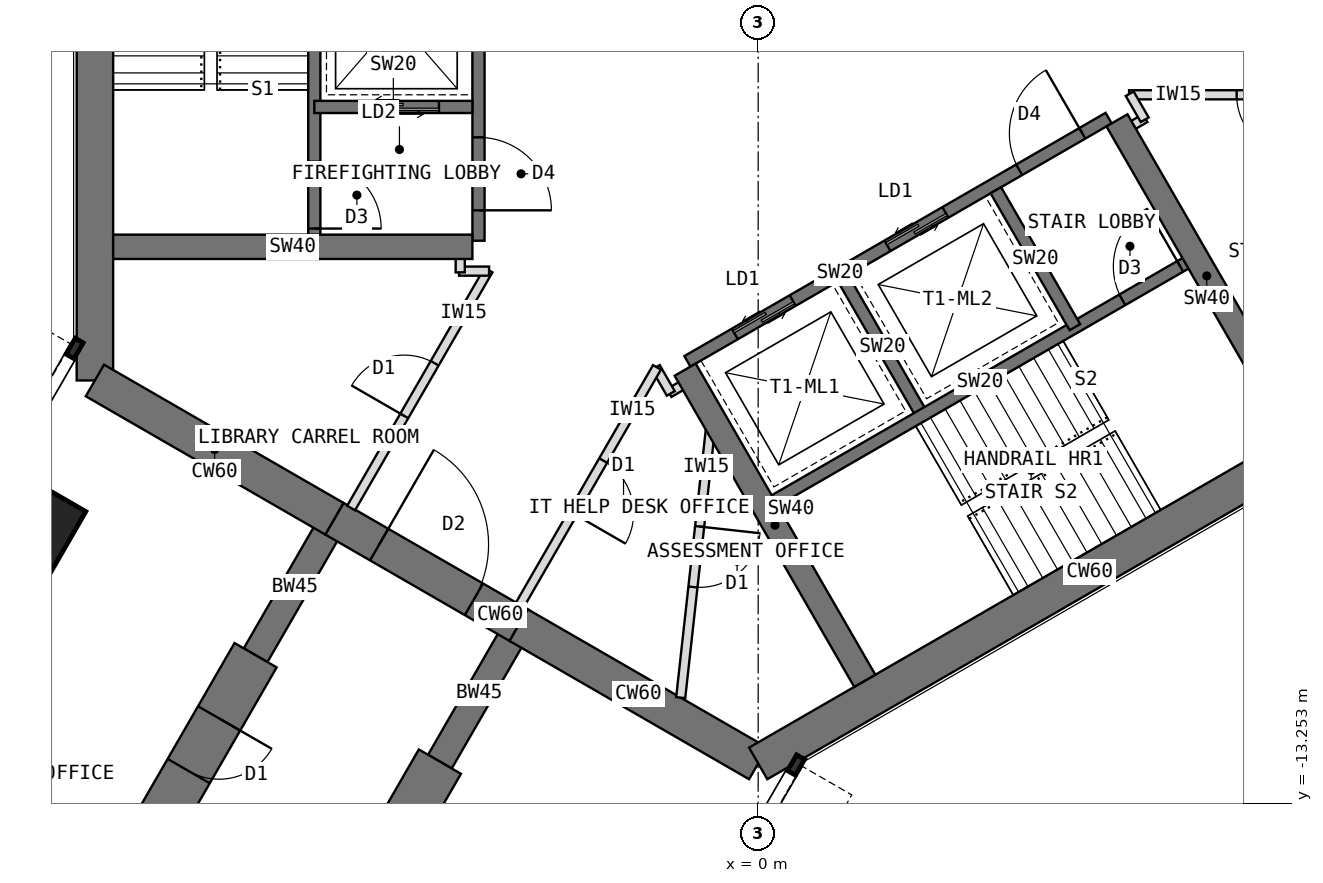
"""IFC4 building model, lengths in metres.
Left out: names, types, materials, properties, quantities, classifications, styles, units other than length and angle.
Written with IfcOpenShell. Run it as: python <this file> out.ifc"""

import sys

from ifc_helpers import new_model, si_unit, direction, frame, frame_2d, origin, origin_2d, place, context, subcontext, project, spatial, rectangle, extrude, element, fill, save


model = new_model("IFC4")
c1 = context("Model", 3, precision=1e-05, world=origin(), true_north=direction((0.0, 1.0)))
c2 = subcontext(c1, "Body", "Model", "MODEL_VIEW")
j1 = project(units=[si_unit("LENGTHUNIT", "METRE"), si_unit("PLANEANGLEUNIT", "RADIAN")], contexts=[c1])
p1 = place(None, origin())
s1 = spatial("IfcSite", under=j1, at=p1, CompositionType="ELEMENT")
p2 = place(p1, origin())
s2 = spatial("IfcBuilding", under=s1, at=p2, CompositionType="ELEMENT")
p3 = place(p2, frame((0.0, 0.0, 121.5)))
s3 = spatial("IfcBuildingStorey", under=s2, at=p3, CompositionType="ELEMENT", Elevation=121.5)
p4 = place(p3, frame((-10.908, 6.298, 0.0), z_axis=(0.0, 0.0, 1.0), x_axis=(0.0, -1.0, 0.0)))
e1 = element("IfcWall", 1, at=p4, inside=s3, PredefinedType="SHEAR", context=c2, shape_type="SweptSolid", body=[
    extrude(rectangle(XDim=12.596, YDim=0.6, at=frame_2d((6.298, 0.0))), origin(), (0.0, 0.0, 1.0), 4.0),
])
p5 = place(p3, frame((-10.908, -6.298, 0.0), z_axis=(0.0, 0.0, 1.0), x_axis=(0.866034513004, -0.499984222037, 0.0)))
e2 = element("IfcWall", 2, at=p5, inside=s3, PredefinedType="SHEAR", context=c2, shape_type="SweptSolid", body=[
    extrude(rectangle(XDim=4.548, YDim=0.6, at=frame_2d((2.274, 0.0))), origin(), (0.0, 0.0, 1.0), 4.0),
])
p6 = place(p3, frame((-6.97, -8.572, 0.0), z_axis=(0.0, 0.0, 1.0), x_axis=(0.866019471182, -0.500010275428, 0.0)))
e3 = element("IfcWall", 3, at=p6, inside=s3, PredefinedType="SHEAR", context=c2, shape_type="SweptSolid", body=[
    extrude(rectangle(XDim=3.5, YDim=0.6, at=frame_2d((1.75, 0.0))), origin(), (0.0, 0.0, 1.0), 4.0),
])
p7 = place(p6, frame((0.85, 0.0, 0.0)))
e4 = element("IfcOpeningElement", 4, at=p7, cuts=e3, PredefinedType="OPENING", context=c2, shape_type="SweptSolid", body=[
    extrude(rectangle(XDim=1.8, YDim=2.1, at=frame_2d((0.9, 1.05))), frame((0.0, 0.31, 0.0), z_axis=(0.0, -1.0, 0.0), x_axis=(1.0, 0.0, 0.0)), (0.0, 0.0, 1.0), 0.62),
])
p8 = place(p3, frame((-3.939, -10.322, 0.0), z_axis=(0.0, 0.0, 1.0), x_axis=(0.866011268655, -0.500024481964, 0.0)))
e5 = element("IfcWall", 5, at=p8, inside=s3, PredefinedType="SHEAR", context=c2, shape_type="SweptSolid", body=[
    extrude(rectangle(XDim=4.548, YDim=0.6, at=frame_2d((2.274, 0.0))), origin(), (0.0, 0.0, 1.0), 4.0),
])
p9 = place(p3, frame((0.0, -12.596, 0.0), z_axis=(0.0, 0.0, 1.0), x_axis=(0.866021940709, 0.500005998175, 0.0)))
e6 = element("IfcWall", 6, at=p9, inside=s3, PredefinedType="SHEAR", context=c2, shape_type="SweptSolid", body=[
    extrude(rectangle(XDim=12.596, YDim=0.6, at=frame_2d((6.298, 0.0))), origin(), (0.0, 0.0, 1.0), 4.0),
])
p10 = place(p3, frame((-3.939, -10.322, 0.0), z_axis=(0.0, 0.0, 1.0), x_axis=(-0.499918158782, -0.866072649678, 0.0)))
e7 = element("IfcWall", 7, at=p10, inside=s3, PredefinedType="SHEAR", context=c2, shape_type="SweptSolid", body=[
    extrude(rectangle(XDim=2.592, YDim=0.45, at=frame_2d((1.296, 0.0))), origin(), (0.0, 0.0, 1.0), 4.0),
])
p11 = place(p3, frame((-5.234, -12.566, 0.0), z_axis=(0.0, 0.0, 1.0), x_axis=(-0.499997557548, -0.86602681393, 0.0)))
e8 = element("IfcWall", 8, at=p11, inside=s3, PredefinedType="SHEAR", context=c2, shape_type="SweptSolid", body=[
    extrude(rectangle(XDim=9.5, YDim=0.8, at=frame_2d((4.75, 0.0))), origin(), (0.0, 0.0, 1.0), 4.0),
])
p12 = place(p11, frame((1.2, 0.0, 0.0)))
e9 = element("IfcOpeningElement", 9, at=p12, cuts=e8, PredefinedType="OPENING", context=c2, shape_type="SweptSolid", body=[
    extrude(rectangle(XDim=1.0, YDim=2.1, at=frame_2d((0.5, 1.05))), frame((0.0, 0.41, 0.0), z_axis=(0.0, -1.0, 0.0), x_axis=(1.0, 0.0, 0.0)), (0.0, 0.0, 1.0), 0.82),
])
p13 = place(p3, frame((-6.97, -8.572, 0.0), z_axis=(0.0, 0.0, 1.0), x_axis=(-0.499988811324, -0.866031863473, 0.0)))
e10 = element("IfcWall", 10, at=p13, inside=s3, PredefinedType="SHEAR", context=c2, shape_type="SweptSolid", body=[
    extrude(rectangle(XDim=2.592, YDim=0.45, at=frame_2d((1.296, 0.0))), origin(), (0.0, 0.0, 1.0), 4.0),
])
p14 = place(p3, frame((-8.266, -10.816, 0.0), z_axis=(0.0, 0.0, 1.0), x_axis=(-0.499997557548, -0.86602681393, 0.0)))
e11 = element("IfcWall", 11, at=p14, inside=s3, PredefinedType="SHEAR", context=c2, shape_type="SweptSolid", body=[
    extrude(rectangle(XDim=9.5, YDim=0.8, at=frame_2d((4.75, 0.0))), origin(), (0.0, 0.0, 1.0), 4.0),
])
p15 = place(p14, frame((1.2, 0.0, 0.0)))
e12 = element("IfcOpeningElement", 12, at=p15, cuts=e11, PredefinedType="OPENING", context=c2, shape_type="SweptSolid", body=[
    extrude(rectangle(XDim=1.0, YDim=2.1, at=frame_2d((0.5, 1.05))), frame((0.0, 0.41, 0.0), z_axis=(0.0, -1.0, 0.0), x_axis=(1.0, 0.0, 0.0)), (0.0, 0.0, 1.0), 0.82),
])
p16 = place(p3, frame((-11.946, -8.691, 0.0), z_axis=(0.0, 0.0, 1.0), x_axis=(0.5, 0.866025403784, 0.0)))
e13 = element("IfcColumn", 13, at=p16, inside=s3, PredefinedType="COLUMN", context=c2, shape_type="SweptSolid", body=[
    extrude(rectangle(XDim=1.3, YDim=1.3, at=origin_2d()), origin(), (0.0, 0.0, 1.0), 4.0),
])
p17 = place(p3, frame((-4.6, 4.0, 0.0), z_axis=(0.0, 0.0, 1.0), x_axis=(0.0, -1.0, 0.0)))
e14 = element("IfcWall", 14, at=p17, inside=s3, PredefinedType="SHEAR", context=c2, shape_type="SweptSolid", body=[
    extrude(rectangle(XDim=8.0, YDim=0.2, at=frame_2d((4.0, 0.0))), origin(), (0.0, 0.0, 1.0), 4.0),
])
p18 = place(p17, frame((6.3, 0.0, 0.0)))
e15 = element("IfcOpeningElement", 15, at=p18, cuts=e14, PredefinedType="OPENING", context=c2, shape_type="SweptSolid", body=[
    extrude(rectangle(XDim=1.2, YDim=2.1, at=frame_2d((0.6, 1.05))), frame((0.0, 0.11, 0.0), z_axis=(0.0, -1.0, 0.0), x_axis=(1.0, 0.0, 0.0)), (0.0, 0.0, 1.0), 0.22),
])
p19 = place(p17, frame((0.9, 0.0, 0.0)))
e16 = element("IfcOpeningElement", 16, at=p19, cuts=e14, PredefinedType="OPENING", context=c2, shape_type="SweptSolid", body=[
    extrude(rectangle(XDim=1.1, YDim=2.2, at=frame_2d((0.55, 1.1))), frame((0.0, 0.11, 0.0), z_axis=(0.0, -1.0, 0.0), x_axis=(1.0, 0.0, 0.0)), (0.0, 0.0, 1.0), 0.22),
])
p20 = place(p3, frame((-4.7, -1.8, 0.0), z_axis=(0.0, 0.0, 1.0), x_axis=(-1.0, 0.0, 0.0)))
e17 = element("IfcWall", 17, at=p20, inside=s3, PredefinedType="SHEAR", context=c2, shape_type="SweptSolid", body=[
    extrude(rectangle(XDim=2.6, YDim=0.2, at=frame_2d((1.3, 0.0))), origin(), (0.0, 0.0, 1.0), 4.0),
])
p21 = place(p20, frame((0.55, 0.0, 0.0)))
e18 = element("IfcOpeningElement", 18, at=p21, cuts=e17, PredefinedType="OPENING", context=c2, shape_type="SweptSolid", body=[
    extrude(rectangle(XDim=1.3, YDim=2.2, at=frame_2d((0.65, 1.1))), frame((0.0, 0.11, 0.0), z_axis=(0.0, -1.0, 0.0), x_axis=(1.0, 0.0, 0.0)), (0.0, 0.0, 1.0), 0.22),
])
p22 = place(p3, frame((-7.3, 4.0, 0.0), z_axis=(0.0, 0.0, 1.0), x_axis=(0.0, -1.0, 0.0)))
e19 = element("IfcWall", 19, at=p22, inside=s3, PredefinedType="SHEAR", context=c2, shape_type="SweptSolid", body=[
    extrude(rectangle(XDim=8.0, YDim=0.2, at=frame_2d((4.0, 0.0))), origin(), (0.0, 0.0, 1.0), 4.0),
])
p23 = place(p22, frame((6.7, 0.0, 0.0)))
e20 = element("IfcOpeningElement", 20, at=p23, cuts=e19, PredefinedType="OPENING", context=c2, shape_type="SweptSolid", body=[
    extrude(rectangle(XDim=1.1, YDim=2.1, at=frame_2d((0.55, 1.05))), frame((0.0, 0.11, 0.0), z_axis=(0.0, -1.0, 0.0), x_axis=(1.0, 0.0, 0.0)), (0.0, 0.0, 1.0), 0.22),
])
p24 = place(p3, frame((-4.7, -4.1, 0.0), z_axis=(0.0, 0.0, 1.0), x_axis=(-1.0, 0.0, 0.0)))
e21 = element("IfcWall", 21, at=p24, inside=s3, PredefinedType="SHEAR", context=c2, shape_type="SweptSolid", body=[
    extrude(rectangle(XDim=5.908, YDim=0.4, at=frame_2d((2.954, 0.0))), origin(), (0.0, 0.0, 1.0), 4.0),
])
p25 = place(p3, frame((-1.164, -5.984, 0.0), z_axis=(0.0, 0.0, 1.0), x_axis=(0.866026010844, 0.49999894854, 0.0)))
e22 = element("IfcWall", 22, at=p25, inside=s3, PredefinedType="SHEAR", context=c2, shape_type="SweptSolid", body=[
    extrude(rectangle(XDim=8.0, YDim=0.2, at=frame_2d((4.0, 0.0))), origin(), (0.0, 0.0, 1.0), 4.0),
])
p26 = place(p25, frame((6.3, 0.0, 0.0)))
e23 = element("IfcOpeningElement", 23, at=p26, cuts=e22, PredefinedType="OPENING", context=c2, shape_type="SweptSolid", body=[
    extrude(rectangle(XDim=1.2, YDim=2.1, at=frame_2d((0.6, 1.05))), frame((0.0, 0.11, 0.0), z_axis=(0.0, -1.0, 0.0), x_axis=(1.0, 0.0, 0.0)), (0.0, 0.0, 1.0), 0.22),
])
p27 = place(p25, frame((0.9, 0.0, 0.0)))
e24 = element("IfcOpeningElement", 24, at=p27, cuts=e22, PredefinedType="OPENING", context=c2, shape_type="SweptSolid", body=[
    extrude(rectangle(XDim=1.1, YDim=2.2, at=frame_2d((0.55, 1.1))), frame((0.0, 0.11, 0.0), z_axis=(0.0, -1.0, 0.0), x_axis=(1.0, 0.0, 0.0)), (0.0, 0.0, 1.0), 0.22),
])
p28 = place(p25, frame((3.8, 0.0, 0.0)))
e25 = element("IfcOpeningElement", 25, at=p28, cuts=e22, PredefinedType="OPENING", context=c2, shape_type="SweptSolid", body=[
    extrude(rectangle(XDim=1.1, YDim=2.2, at=frame_2d((0.55, 1.1))), frame((0.0, 0.11, 0.0), z_axis=(0.0, -1.0, 0.0), x_axis=(1.0, 0.0, 0.0)), (0.0, 0.0, 1.0), 0.22),
])
p29 = place(p3, frame((1.397, -4.62, 0.0), z_axis=(0.0, 0.0, 1.0), x_axis=(0.499936506574, -0.866062058628, 0.0)))
e26 = element("IfcWall", 26, at=p29, inside=s3, PredefinedType="SHEAR", context=c2, shape_type="SweptSolid", body=[
    extrude(rectangle(XDim=2.6, YDim=0.2, at=frame_2d((1.3, 0.0))), origin(), (0.0, 0.0, 1.0), 4.0),
])
p30 = place(p3, frame((3.909, -3.17, 0.0), z_axis=(0.0, 0.0, 1.0), x_axis=(0.49997716683, -0.86603858612, 0.0)))
e27 = element("IfcWall", 27, at=p30, inside=s3, PredefinedType="SHEAR", context=c2, shape_type="SweptSolid", body=[
    extrude(rectangle(XDim=2.6, YDim=0.2, at=frame_2d((1.3, 0.0))), origin(), (0.0, 0.0, 1.0), 4.0),
])
p31 = place(p3, frame((0.186, -8.322, 0.0), z_axis=(0.0, 0.0, 1.0), x_axis=(0.866026010844, 0.49999894854, 0.0)))
e28 = element("IfcWall", 28, at=p31, inside=s3, PredefinedType="SHEAR", context=c2, shape_type="SweptSolid", body=[
    extrude(rectangle(XDim=8.0, YDim=0.2, at=frame_2d((4.0, 0.0))), origin(), (0.0, 0.0, 1.0), 4.0),
])
p32 = place(p31, frame((6.7, 0.0, 0.0)))
e29 = element("IfcOpeningElement", 29, at=p32, cuts=e28, PredefinedType="OPENING", context=c2, shape_type="SweptSolid", body=[
    extrude(rectangle(XDim=1.1, YDim=2.1, at=frame_2d((0.55, 1.05))), frame((0.0, 0.11, 0.0), z_axis=(0.0, -1.0, 0.0), x_axis=(1.0, 0.0, 0.0)), (0.0, 0.0, 1.0), 0.22),
])
p33 = place(p3, frame((5.901, -2.02, 0.0), z_axis=(0.0, 0.0, 1.0), x_axis=(0.500027676417, -0.866009424208, 0.0)))
e30 = element("IfcWall", 30, at=p33, inside=s3, PredefinedType="SHEAR", context=c2, shape_type="SweptSolid", body=[
    extrude(rectangle(XDim=5.908, YDim=0.4, at=frame_2d((2.954, 0.0))), origin(), (0.0, 0.0, 1.0), 4.0),
])
p34 = place(p3, frame((-1.201, -6.12, 0.0), z_axis=(0.0, 0.0, 1.0), x_axis=(0.49999668571, -0.866027317282, 0.0)))
e31 = element("IfcWall", 31, at=p34, inside=s3, PredefinedType="SHEAR", context=c2, shape_type="SweptSolid", body=[
    extrude(rectangle(XDim=5.908, YDim=0.4, at=frame_2d((2.954, 0.0))), origin(), (0.0, 0.0, 1.0), 4.0),
])
for number, where, z_axis, x_axis in (
    (32, (6.365, -1.983, 0.0), (0.0, 0.0, 1.0), (-0.866, -0.5, 0.0)),
    (33, (-1.092, -6.289, 0.0), (0.0, 0.0, 1.0), (-0.866, -0.5, 0.0)),
):
    element("IfcWall", number, at=place(p3, frame(where, z_axis=z_axis, x_axis=x_axis)), inside=s3, PredefinedType="PARTITIONING", context=c2, shape_type="SweptSolid", body=[
        extrude(rectangle(XDim=0.43, YDim=0.15, at=frame_2d((0.215, 0.0))), origin(), (0.0, 0.0, 1.0), 3.8),
    ])
p35 = place(p3, frame((-1.437, -6.511, 0.0), z_axis=(0.0, 0.0, 1.0), x_axis=(-0.50033519877, 0.865831790172, 0.0)))
e34 = element("IfcWall", 34, at=p35, inside=s3, PredefinedType="PARTITIONING", context=c2, shape_type="SweptSolid", body=[
    extrude(rectangle(XDim=0.494, YDim=0.15, at=frame_2d((0.247, 0.0))), origin(), (0.0, 0.0, 1.0), 3.8),
])
p36 = place(p3, frame((-1.664, -6.083, 0.0), z_axis=(0.0, 0.0, 1.0), x_axis=(-0.500032713409, -0.866006515865, 0.0)))
e35 = element("IfcWall", 35, at=p36, inside=s3, PredefinedType="PARTITIONING", context=c2, shape_type="SweptSolid", body=[
    extrude(rectangle(XDim=4.518, YDim=0.15, at=frame_2d((2.259, 0.0))), origin(), (0.0, 0.0, 1.0), 3.8),
])
p37 = place(p36, frame((1.769, 0.0, 0.0)))
e36 = element("IfcOpeningElement", 36, at=p37, cuts=e35, PredefinedType="OPENING", context=c2, shape_type="SweptSolid", body=[
    extrude(rectangle(XDim=1.0, YDim=2.1, at=frame_2d((0.5, 1.05))), frame((0.0, 0.085, 0.0), z_axis=(0.0, -1.0, 0.0), x_axis=(1.0, 0.0, 0.0)), (0.0, 0.0, 1.0), 0.17),
])
p38 = place(p3, frame((-6.695, -8.396, 0.0), z_axis=(0.0, 0.0, 1.0), x_axis=(0.500009315796, 0.86602002524, 0.0)))
e37 = element("IfcWall", 37, at=p38, inside=s3, PredefinedType="PARTITIONING", context=c2, shape_type="SweptSolid", body=[
    extrude(rectangle(XDim=4.519, YDim=0.15, at=frame_2d((2.259, 0.0))), origin(), (0.0, 0.0, 1.0), 3.8),
])
p39 = place(p38, frame((1.749, 0.0, 0.0)))
e38 = element("IfcOpeningElement", 38, at=p39, cuts=e37, PredefinedType="OPENING", context=c2, shape_type="SweptSolid", body=[
    extrude(rectangle(XDim=1.0, YDim=2.1, at=frame_2d((0.5, 1.05))), frame((0.0, 0.085, 0.0), z_axis=(0.0, -1.0, 0.0), x_axis=(1.0, 0.0, 0.0)), (0.0, 0.0, 1.0), 0.17),
])
p40 = place(p3, frame((-4.426, -4.5, 0.0), z_axis=(0.0, 0.0, 1.0), x_axis=(-1.0, 0.0, 0.0)))
e39 = element("IfcWall", 39, at=p40, inside=s3, PredefinedType="PARTITIONING", context=c2, shape_type="SweptSolid", body=[
    extrude(rectangle(XDim=0.494, YDim=0.15, at=frame_2d((0.247, 0.0))), origin(), (0.0, 0.0, 1.0), 3.8),
])
p41 = place(p3, frame((-4.9, -4.52, 0.0), z_axis=(0.0, 0.0, 1.0), x_axis=(0.0, 1.0, 0.0)))
e40 = element("IfcWall", 40, at=p41, inside=s3, PredefinedType="PARTITIONING", context=c2, shape_type="SweptSolid", body=[
    extrude(rectangle(XDim=0.43, YDim=0.15, at=frame_2d((0.215, 0.0))), origin(), (0.0, 0.0, 1.0), 3.8),
])
p42 = place(p3, frame((10.618, -1.6, 0.0), z_axis=(0.0, 0.0, 1.0), x_axis=(-1.0, 0.0, 0.0)))
e41 = element("IfcWall", 41, at=p42, inside=s3, PredefinedType="PARTITIONING", context=c2, shape_type="SweptSolid", body=[
    extrude(rectangle(XDim=4.519, YDim=0.15, at=frame_2d((2.259, 0.0))), origin(), (0.0, 0.0, 1.0), 3.8),
])
p43 = place(p42, frame((1.749, 0.0, 0.0)))
e42 = element("IfcOpeningElement", 42, at=p43, cuts=e41, PredefinedType="OPENING", context=c2, shape_type="SweptSolid", body=[
    extrude(rectangle(XDim=1.0, YDim=2.1, at=frame_2d((0.5, 1.05))), frame((0.0, 0.085, 0.0), z_axis=(0.0, -1.0, 0.0), x_axis=(1.0, 0.0, 0.0)), (0.0, 0.0, 1.0), 0.17),
])
p44 = place(p3, frame((6.11, -1.583, 0.0), z_axis=(0.0, 0.0, 1.0), x_axis=(0.50033519877, -0.865831790172, 0.0)))
e43 = element("IfcWall", 43, at=p44, inside=s3, PredefinedType="PARTITIONING", context=c2, shape_type="SweptSolid", body=[
    extrude(rectangle(XDim=0.494, YDim=0.15, at=frame_2d((0.247, 0.0))), origin(), (0.0, 0.0, 1.0), 3.8),
])
p45 = place(p3, frame((-0.761, -6.881, 0.0), z_axis=(0.0, 0.0, 1.0), x_axis=(-0.109994603044, -0.993932184458, 0.0)))
e44 = element("IfcWall", 44, at=p45, inside=s3, PredefinedType="PARTITIONING", context=c2, shape_type="SweptSolid", body=[
    extrude(rectangle(XDim=4.661, YDim=0.15, at=frame_2d((2.331, 0.0))), origin(), (0.0, 0.0, 1.0), 3.8),
])
p46 = place(p45, frame((1.831, 0.0, 0.0)))
e45 = element("IfcOpeningElement", 45, at=p46, cuts=e44, PredefinedType="OPENING", context=c2, shape_type="SweptSolid", body=[
    extrude(rectangle(XDim=1.0, YDim=2.1, at=frame_2d((0.5, 1.05))), frame((0.0, 0.085, 0.0), z_axis=(0.0, -1.0, 0.0), x_axis=(1.0, 0.0, 0.0)), (0.0, 0.0, 1.0), 0.17),
])
p47 = place(p18, origin())
e46 = element("IfcDoor", 46, at=p47, inside=s3, OperationType="SINGLE_SWING_RIGHT", PredefinedType="DOOR", context=c2, shape_type="SweptSolid", body=[
    extrude(rectangle(XDim=1.2, YDim=2.1, at=frame_2d((0.6, 1.05))), frame((0.0, 0.025, 0.0), z_axis=(0.0, -1.0, 0.0), x_axis=(1.0, 0.0, 0.0)), (0.0, 0.0, 1.0), 0.05),
])
fill(e15, e46)
p48 = place(p21, origin())
e47 = element("IfcDoor", 47, at=p48, inside=s3, OperationType="DOUBLE_DOOR_SLIDING", PredefinedType="DOOR", context=c2, shape_type="SweptSolid", body=[
    extrude(rectangle(XDim=1.3, YDim=2.2, at=frame_2d((0.65, 1.1))), frame((0.0, 0.025, 0.0), z_axis=(0.0, -1.0, 0.0), x_axis=(1.0, 0.0, 0.0)), (0.0, 0.0, 1.0), 0.05),
])
fill(e18, e47)
p49 = place(p23, origin())
e48 = element("IfcDoor", 48, at=p49, inside=s3, OperationType="SINGLE_SWING_RIGHT", PredefinedType="DOOR", context=c2, shape_type="SweptSolid", body=[
    extrude(rectangle(XDim=1.1, YDim=2.1, at=frame_2d((0.55, 1.05))), frame((0.0, 0.025, 0.0), z_axis=(0.0, -1.0, 0.0), x_axis=(1.0, 0.0, 0.0)), (0.0, 0.0, 1.0), 0.05),
])
fill(e20, e48)
p50 = place(p26, origin())
e49 = element("IfcDoor", 49, at=p50, inside=s3, OperationType="SINGLE_SWING_RIGHT", PredefinedType="DOOR", context=c2, shape_type="SweptSolid", body=[
    extrude(rectangle(XDim=1.2, YDim=2.1, at=frame_2d((0.6, 1.05))), frame((0.0, 0.025, 0.0), z_axis=(0.0, -1.0, 0.0), x_axis=(1.0, 0.0, 0.0)), (0.0, 0.0, 1.0), 0.05),
])
fill(e23, e49)
p51 = place(p27, origin())
e50 = element("IfcDoor", 50, at=p51, inside=s3, OperationType="DOUBLE_DOOR_SLIDING", PredefinedType="DOOR", context=c2, shape_type="SweptSolid", body=[
    extrude(rectangle(XDim=1.1, YDim=2.2, at=frame_2d((0.55, 1.1))), frame((0.0, 0.025, 0.0), z_axis=(0.0, -1.0, 0.0), x_axis=(1.0, 0.0, 0.0)), (0.0, 0.0, 1.0), 0.05),
])
fill(e24, e50)
p52 = place(p28, origin())
e51 = element("IfcDoor", 51, at=p52, inside=s3, OperationType="DOUBLE_DOOR_SLIDING", PredefinedType="DOOR", context=c2, shape_type="SweptSolid", body=[
    extrude(rectangle(XDim=1.1, YDim=2.2, at=frame_2d((0.55, 1.1))), frame((0.0, 0.025, 0.0), z_axis=(0.0, -1.0, 0.0), x_axis=(1.0, 0.0, 0.0)), (0.0, 0.0, 1.0), 0.05),
])
fill(e25, e51)
p53 = place(p32, origin())
e52 = element("IfcDoor", 52, at=p53, inside=s3, OperationType="SINGLE_SWING_RIGHT", PredefinedType="DOOR", context=c2, shape_type="SweptSolid", body=[
    extrude(rectangle(XDim=1.1, YDim=2.1, at=frame_2d((0.55, 1.05))), frame((0.0, 0.025, 0.0), z_axis=(0.0, -1.0, 0.0), x_axis=(1.0, 0.0, 0.0)), (0.0, 0.0, 1.0), 0.05),
])
fill(e29, e52)
p54 = place(p7, origin())
e53 = element("IfcDoor", 53, at=p54, inside=s3, OperationType="DOUBLE_DOOR_DOUBLE_SWING", PredefinedType="DOOR", context=c2, shape_type="SweptSolid", body=[
    extrude(rectangle(XDim=1.72, YDim=2.06, at=frame_2d((0.9, 1.03))), frame((0.0, 0.025, 0.0), z_axis=(0.0, -1.0, 0.0), x_axis=(1.0, 0.0, 0.0)), (0.0, 0.0, 1.0), 0.05),
    extrude(rectangle(XDim=0.04, YDim=2.1, at=frame_2d((0.02, 1.05))), frame((0.0, 0.3, 0.0), z_axis=(0.0, -1.0, 0.0), x_axis=(1.0, 0.0, 0.0)), (0.0, 0.0, 1.0), 0.6),
    extrude(rectangle(XDim=0.04, YDim=2.1, at=frame_2d((1.78, 1.05))), frame((0.0, 0.3, 0.0), z_axis=(0.0, -1.0, 0.0), x_axis=(1.0, 0.0, 0.0)), (0.0, 0.0, 1.0), 0.6),
    extrude(rectangle(XDim=1.72, YDim=0.04, at=frame_2d((0.9, 2.08))), frame((0.0, 0.3, 0.0), z_axis=(0.0, -1.0, 0.0), x_axis=(1.0, 0.0, 0.0)), (0.0, 0.0, 1.0), 0.6),
])
fill(e4, e53)
p55 = place(p39, origin())
e54 = element("IfcDoor", 54, at=p55, inside=s3, OperationType="SINGLE_SWING_LEFT", PredefinedType="DOOR", context=c2, shape_type="SweptSolid", body=[
    extrude(rectangle(XDim=1.0, YDim=2.1, at=frame_2d((0.5, 1.05))), frame((0.0, 0.025, 0.0), z_axis=(0.0, -1.0, 0.0), x_axis=(1.0, 0.0, 0.0)), (0.0, 0.0, 1.0), 0.05),
])
fill(e38, e54)
p56 = place(p37, origin())
e55 = element("IfcDoor", 55, at=p56, inside=s3, OperationType="SINGLE_SWING_RIGHT", PredefinedType="DOOR", context=c2, shape_type="SweptSolid", body=[
    extrude(rectangle(XDim=1.0, YDim=2.1, at=frame_2d((0.5, 1.05))), frame((0.0, 0.025, 0.0), z_axis=(0.0, -1.0, 0.0), x_axis=(1.0, 0.0, 0.0)), (0.0, 0.0, 1.0), 0.05),
])
fill(e36, e55)
p57 = place(p46, origin())
e56 = element("IfcDoor", 56, at=p57, inside=s3, OperationType="SINGLE_SWING_LEFT", PredefinedType="DOOR", context=c2, shape_type="SweptSolid", body=[
    extrude(rectangle(XDim=1.0, YDim=2.1, at=frame_2d((0.5, 1.05))), frame((0.0, 0.025, 0.0), z_axis=(0.0, -1.0, 0.0), x_axis=(1.0, 0.0, 0.0)), (0.0, 0.0, 1.0), 0.05),
])
fill(e45, e56)
p58 = place(p43, origin())
e57 = element("IfcDoor", 57, at=p58, inside=s3, OperationType="SINGLE_SWING_LEFT", PredefinedType="DOOR", context=c2, shape_type="SweptSolid", body=[
    extrude(rectangle(XDim=1.0, YDim=2.1, at=frame_2d((0.5, 1.05))), frame((0.0, 0.025, 0.0), z_axis=(0.0, -1.0, 0.0), x_axis=(1.0, 0.0, 0.0)), (0.0, 0.0, 1.0), 0.05),
])
fill(e42, e57)
p59 = place(p15, origin())
e58 = element("IfcDoor", 58, at=p59, inside=s3, OperationType="SINGLE_SWING_LEFT", PredefinedType="DOOR", context=c2, shape_type="SweptSolid", body=[
    extrude(rectangle(XDim=0.92, YDim=2.06, at=frame_2d((0.5, 1.03))), frame((0.0, 0.025, 0.0), z_axis=(0.0, -1.0, 0.0), x_axis=(1.0, 0.0, 0.0)), (0.0, 0.0, 1.0), 0.05),
    extrude(rectangle(XDim=0.04, YDim=2.1, at=frame_2d((0.02, 1.05))), frame((0.0, 0.4, 0.0), z_axis=(0.0, -1.0, 0.0), x_axis=(1.0, 0.0, 0.0)), (0.0, 0.0, 1.0), 0.8),
    extrude(rectangle(XDim=0.04, YDim=2.1, at=frame_2d((0.98, 1.05))), frame((0.0, 0.4, 0.0), z_axis=(0.0, -1.0, 0.0), x_axis=(1.0, 0.0, 0.0)), (0.0, 0.0, 1.0), 0.8),
    extrude(rectangle(XDim=0.92, YDim=0.04, at=frame_2d((0.5, 2.08))), frame((0.0, 0.4, 0.0), z_axis=(0.0, -1.0, 0.0), x_axis=(1.0, 0.0, 0.0)), (0.0, 0.0, 1.0), 0.8),
])
fill(e12, e58)
save(model, sys.argv[1])
